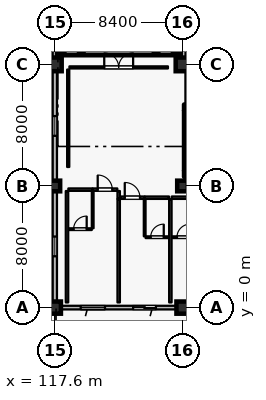
"""IFC4 building model, lengths in metres.
Left out: names, types, materials, properties, quantities, classifications, styles, units other than length and angle.
Written with IfcOpenShell. Run it as: python <this file> out.ifc"""

import sys

from ifc_helpers import new_model, si_unit, direction, frame, frame_2d, origin, origin_2d, place, context, subcontext, project, spatial, rectangle, hollow_rectangle, extrude, element, fill, save


model = new_model("IFC4")
c1 = context("Model", 3, precision=1e-05, world=origin(), true_north=direction((0.0, 1.0)))
c2 = subcontext(c1, "Body", "Model", "MODEL_VIEW")
j1 = project(units=[si_unit("LENGTHUNIT", "METRE"), si_unit("PLANEANGLEUNIT", "RADIAN")], contexts=[c1])
p1 = place(None, origin())
s1 = spatial("IfcSite", under=j1, at=p1, CompositionType="ELEMENT")
p2 = place(p1, origin())
s2 = spatial("IfcBuilding", under=s1, at=p2, CompositionType="ELEMENT")
p3 = place(p2, frame((0.0, 0.0, 25.2)))
s3 = spatial("IfcBuildingStorey", under=s2, at=p3, CompositionType="ELEMENT", Elevation=25.2)
p4 = place(p3, frame((117.6, 0.0, 0.0), z_axis=(0.0, 0.0, 1.0), x_axis=(1.0, 0.0, 0.0)))
e1 = element("IfcColumn", 1, at=p4, inside=s3, PredefinedType="COLUMN", context=c2, shape_type="SweptSolid", body=[
    extrude(rectangle(XDim=0.8, YDim=0.8, at=origin_2d()), origin(), (0.0, 0.0, 1.0), 3.6),
])
p5 = place(p3, frame((117.6, 16.0, 0.0), z_axis=(0.0, 0.0, 1.0), x_axis=(1.0, 0.0, 0.0)))
e2 = element("IfcColumn", 2, at=p5, inside=s3, PredefinedType="COLUMN", context=c2, shape_type="SweptSolid", body=[
    extrude(rectangle(XDim=0.9, YDim=0.9, at=origin_2d()), origin(), (0.0, 0.0, 1.0), 3.6),
])
p6 = place(p3, frame((126.0, 0.0, 0.0), z_axis=(0.0, 0.0, 1.0), x_axis=(1.0, 0.0, 0.0)))
e3 = element("IfcColumn", 3, at=p6, inside=s3, PredefinedType="COLUMN", context=c2, shape_type="SweptSolid", body=[
    extrude(rectangle(XDim=0.8, YDim=0.8, at=origin_2d()), origin(), (0.0, 0.0, 1.0), 3.6),
])
p7 = place(p3, frame((126.0, 16.0, 0.0), z_axis=(0.0, 0.0, 1.0), x_axis=(1.0, 0.0, 0.0)))
e4 = element("IfcColumn", 4, at=p7, inside=s3, PredefinedType="COLUMN", context=c2, shape_type="SweptSolid", body=[
    extrude(rectangle(XDim=0.9, YDim=0.9, at=origin_2d()), origin(), (0.0, 0.0, 1.0), 3.6),
])
for number, where, z_axis, x_axis in (
    (5, (117.6, 8.0, 0.0), (0.0, 0.0, 1.0), (1.0, 0.0, 0.0)),
    (6, (126.0, 8.0, 0.0), (0.0, 0.0, 1.0), (1.0, 0.0, 0.0)),
):
    element("IfcColumn", number, at=place(p3, frame(where, z_axis=z_axis, x_axis=x_axis)), inside=s3, PredefinedType="COLUMN", context=c2, shape_type="SweptSolid", body=[
        extrude(rectangle(XDim=0.7, YDim=0.7, at=origin_2d()), origin(), (0.0, 0.0, 1.0), 3.6),
    ])
p8 = place(p3, frame((125.6, 0.0, 0.0), z_axis=(0.0, 0.0, 1.0), x_axis=(-1.0, 0.0, 0.0)))
e7 = element("IfcWall", 7, at=p8, inside=s3, PredefinedType="SOLIDWALL", context=c2, shape_type="SweptSolid", body=[
    extrude(rectangle(XDim=7.6, YDim=0.24, at=frame_2d((3.8, 0.0))), origin(), (0.0, 0.0, 1.0), 2.93),
])
p9 = place(p8, frame((1.35, 0.0, 0.0)))
e8 = element("IfcOpeningElement", 8, at=p9, cuts=e7, PredefinedType="OPENING", context=c2, shape_type="SweptSolid", body=[
    extrude(rectangle(XDim=1.5, YDim=2.25, at=frame_2d((0.75, 1.125))), frame((0.0, 0.13, 0.0), z_axis=(0.0, -1.0, 0.0), x_axis=(1.0, 0.0, 0.0)), (0.0, 0.0, 1.0), 0.26),
])
p10 = place(p8, frame((4.7, 0.0, 0.8)))
e9 = element("IfcOpeningElement", 9, at=p10, cuts=e7, PredefinedType="OPENING", context=c2, shape_type="SweptSolid", body=[
    extrude(rectangle(XDim=1.6, YDim=1.6, at=frame_2d((0.8, 0.8))), frame((0.0, 0.13, 0.0), z_axis=(0.0, -1.0, 0.0), x_axis=(1.0, 0.0, 0.0)), (0.0, 0.0, 1.0), 0.26),
])
p11 = place(p3, frame((117.6, 0.4, 0.0), z_axis=(0.0, 0.0, 1.0), x_axis=(0.0, 1.0, 0.0)))
e10 = element("IfcWall", 10, at=p11, inside=s3, PredefinedType="SOLIDWALL", context=c2, shape_type="SweptSolid", body=[
    extrude(rectangle(XDim=7.25, YDim=0.28, at=frame_2d((3.625, 0.0))), origin(), (0.0, 0.0, 1.0), 2.7),
])
p12 = place(p11, frame((2.975, 0.0, 0.5)))
e11 = element("IfcOpeningElement", 11, at=p12, cuts=e10, PredefinedType="OPENING", context=c2, shape_type="SweptSolid", body=[
    extrude(rectangle(XDim=1.3, YDim=1.65, at=frame_2d((0.65, 0.825))), frame((0.0, 0.15, 0.0), z_axis=(0.0, -1.0, 0.0), x_axis=(1.0, 0.0, 0.0)), (0.0, 0.0, 1.0), 0.3),
])
p13 = place(p3, frame((117.6, 8.35, 0.0), z_axis=(0.0, 0.0, 1.0), x_axis=(0.0, 1.0, 0.0)))
e12 = element("IfcWall", 12, at=p13, inside=s3, PredefinedType="SOLIDWALL", context=c2, shape_type="SweptSolid", body=[
    extrude(rectangle(XDim=7.2, YDim=0.28, at=frame_2d((3.6, 0.0))), origin(), (0.0, 0.0, 1.0), 2.7),
])
p14 = place(p13, frame((2.95, 0.0, 0.5)))
e13 = element("IfcOpeningElement", 13, at=p14, cuts=e12, PredefinedType="OPENING", context=c2, shape_type="SweptSolid", body=[
    extrude(rectangle(XDim=1.3, YDim=1.65, at=frame_2d((0.65, 0.825))), frame((0.0, 0.15, 0.0), z_axis=(0.0, -1.0, 0.0), x_axis=(1.0, 0.0, 0.0)), (0.0, 0.0, 1.0), 0.3),
])
p15 = place(p3, frame((117.6, 16.45, 0.0), z_axis=(0.0, 0.0, 1.0), x_axis=(0.0, 1.0, 0.0)))
e14 = element("IfcWall", 14, at=p15, inside=s3, PredefinedType="SOLIDWALL", context=c2, shape_type="SweptSolid", body=[
    extrude(rectangle(XDim=7.2, YDim=0.28, at=frame_2d((3.6, 0.0))), origin(), (0.0, 0.0, 1.0), 2.7),
])
p16 = place(p15, frame((2.95, 0.0, 0.5)))
e15 = element("IfcOpeningElement", 15, at=p16, cuts=e14, PredefinedType="OPENING", context=c2, shape_type="SweptSolid", body=[
    extrude(rectangle(XDim=1.3, YDim=1.65, at=frame_2d((0.65, 0.825))), frame((0.0, 0.15, 0.0), z_axis=(0.0, -1.0, 0.0), x_axis=(1.0, 0.0, 0.0)), (0.0, 0.0, 1.0), 0.3),
])
p17 = place(p3, frame((126.1, 8.8, 0.0), z_axis=(0.0, 0.0, 1.0), x_axis=(1.0, 0.0, 0.0)))
e16 = element("IfcWall", 16, at=p17, inside=s3, PredefinedType="SHEAR", context=c2, shape_type="SweptSolid", body=[
    extrude(rectangle(XDim=8.2, YDim=0.4, at=frame_2d((4.1, 0.0))), origin(), (0.0, 0.0, 1.0), 3.335),
])
p18 = place(p3, frame((126.1, 13.16, 0.0), z_axis=(0.0, 0.0, 1.0), x_axis=(1.0, 0.0, 0.0)))
e17 = element("IfcWall", 17, at=p18, inside=s3, PredefinedType="SHEAR", context=c2, shape_type="SweptSolid", body=[
    extrude(rectangle(XDim=8.2, YDim=0.4, at=frame_2d((4.1, 0.0))), origin(), (0.0, 0.0, 1.0), 3.335),
])
p19 = place(p18, frame((0.43, 0.0, 0.0)))
e18 = element("IfcOpeningElement", 18, at=p19, cuts=e17, PredefinedType="OPENING", context=c2, shape_type="SweptSolid", body=[
    extrude(rectangle(XDim=1.16, YDim=2.2, at=frame_2d((0.58, 1.1))), frame((0.0, 0.21, 0.0), z_axis=(0.0, -1.0, 0.0), x_axis=(1.0, 0.0, 0.0)), (0.0, 0.0, 1.0), 0.42),
])
p20 = place(p3, frame((126.3, 9.005, 0.0), z_axis=(0.0, 0.0, 1.0), x_axis=(0.0, 1.0, 0.0)))
e19 = element("IfcWall", 19, at=p20, inside=s3, PredefinedType="SHEAR", context=c2, shape_type="SweptSolid", body=[
    extrude(rectangle(XDim=3.95, YDim=0.4, at=frame_2d((1.975, 0.0))), origin(), (0.0, 0.0, 1.0), 3.335),
])
p21 = place(p3, frame((126.3, 13.365, 0.0), z_axis=(0.0, 0.0, 1.0), x_axis=(0.0, 1.0, 0.0)))
e20 = element("IfcWall", 20, at=p21, inside=s3, PredefinedType="PARTITIONING", context=c2, shape_type="SweptSolid", body=[
    extrude(rectangle(XDim=5.82, YDim=0.22, at=frame_2d((2.91, 0.0))), origin(), (0.0, 0.0, 1.0), 3.335),
])
p22 = place(p3, frame((117.75, 16.8, 0.0), z_axis=(0.0, 0.0, 1.0), x_axis=(1.0, 0.0, 0.0)))
e21 = element("IfcWall", 21, at=p22, inside=s3, PredefinedType="SHEAR", context=c2, shape_type="SweptSolid", body=[
    extrude(rectangle(XDim=8.15, YDim=0.4, at=frame_2d((4.075, 0.0))), origin(), (0.0, 0.0, 1.0), 3.335),
])
for number, where, z_axis, x_axis in (
    (22, (118.08, 16.8, 0.0), (0.0, 0.0, 1.0), (1.0, 0.0, 0.0)),
    (23, (119.34, 16.8, 0.0), (0.0, 0.0, 1.0), (1.0, 0.0, 0.0)),
):
    element("IfcColumn", number, at=place(p3, frame(where, z_axis=z_axis, x_axis=x_axis)), inside=s3, PredefinedType="COLUMN", context=c2, shape_type="SweptSolid", body=[
        extrude(hollow_rectangle(XDim=0.3, YDim=0.3, WallThickness=0.012, at=origin_2d()), origin(), (0.0, 0.0, 1.0), 3.42),
    ])
for number, where, z_axis, x_axis in (
    (24, (124.26, 16.8, -2.1), (0.0, 0.0, 1.0), (1.0, 0.0, 0.0)),
    (25, (125.52, 16.8, -2.1), (0.0, 0.0, 1.0), (1.0, 0.0, 0.0)),
):
    element("IfcColumn", number, at=place(p3, frame(where, z_axis=z_axis, x_axis=x_axis)), inside=s3, PredefinedType="COLUMN", context=c2, shape_type="SweptSolid", body=[
        extrude(hollow_rectangle(XDim=0.3, YDim=0.3, WallThickness=0.012, at=origin_2d()), origin(), (0.0, 0.0, 1.0), 3.72),
    ])
p23 = place(p3, frame((118.49, 7.76, 0.0), z_axis=(0.0, 0.0, 1.0), x_axis=(1.0, 0.0, 0.0)))
e26 = element("IfcWall", 26, at=p23, inside=s3, PredefinedType="PARTITIONING", context=c2, shape_type="SweptSolid", body=[
    extrude(rectangle(XDim=1.59, YDim=0.16, at=frame_2d((0.795, 0.0))), origin(), (0.0, 0.0, 1.0), 3.335),
])
p24 = place(p3, frame((120.09, 7.76, 0.0), z_axis=(0.0, 0.0, 1.0), x_axis=(1.0, 0.0, 0.0)))
e27 = element("IfcWall", 27, at=p24, inside=s3, PredefinedType="PARTITIONING", context=c2, shape_type="SweptSolid", body=[
    extrude(rectangle(XDim=1.62, YDim=0.16, at=frame_2d((0.81, 0.0))), origin(), (0.0, 0.0, 1.0), 3.335),
])
p25 = place(p24, frame((0.33, 0.0, 0.0)))
e28 = element("IfcOpeningElement", 28, at=p25, cuts=e27, PredefinedType="OPENING", context=c2, shape_type="SweptSolid", body=[
    extrude(rectangle(XDim=0.96, YDim=2.2, at=frame_2d((0.48, 1.1))), frame((0.0, 0.09, 0.0), z_axis=(0.0, -1.0, 0.0), x_axis=(1.0, 0.0, 0.0)), (0.0, 0.0, 1.0), 0.18),
])
p26 = place(p3, frame((120.09, 5.22, 0.0), z_axis=(0.0, 0.0, 1.0), x_axis=(0.0, 1.0, 0.0)))
e29 = element("IfcWall", 29, at=p26, inside=s3, PredefinedType="PARTITIONING", context=c2, shape_type="SweptSolid", body=[
    extrude(rectangle(XDim=2.45, YDim=0.115, at=frame_2d((1.225, 0.0))), origin(), (0.0, 0.0, 1.0), 3.335),
])
p27 = place(p3, frame((118.5, 5.16, 0.0), z_axis=(0.0, 0.0, 1.0), x_axis=(1.0, 0.0, 0.0)))
e30 = element("IfcWall", 30, at=p27, inside=s3, PredefinedType="PARTITIONING", context=c2, shape_type="SweptSolid", body=[
    extrude(rectangle(XDim=1.53, YDim=0.115, at=frame_2d((0.765, 0.0))), origin(), (0.0, 0.0, 1.0), 3.335),
])
p28 = place(p27, frame((0.335, 0.0, 0.0)))
e31 = element("IfcOpeningElement", 31, at=p28, cuts=e30, PredefinedType="OPENING", context=c2, shape_type="SweptSolid", body=[
    extrude(rectangle(XDim=0.86, YDim=2.12, at=frame_2d((0.43, 1.06))), frame((0.0, 0.067, 0.0), z_axis=(0.0, -1.0, 0.0), x_axis=(1.0, 0.0, 0.0)), (0.0, 0.0, 1.0), 0.135),
])
p29 = place(p3, frame((118.4, 0.34, 0.0), z_axis=(0.0, 0.0, 1.0), x_axis=(0.0, 1.0, 0.0)))
e32 = element("IfcWall", 32, at=p29, inside=s3, PredefinedType="PARTITIONING", context=c2, shape_type="SweptSolid", body=[
    extrude(rectangle(XDim=7.33, YDim=0.16, at=frame_2d((3.665, 0.0))), origin(), (0.0, 0.0, 1.0), 3.335),
])
p30 = place(p3, frame((121.8, 7.15, 0.0), z_axis=(0.0, 0.0, 1.0), x_axis=(0.0, 1.0, 0.0)))
e33 = element("IfcWall", 33, at=p30, inside=s3, PredefinedType="PARTITIONING", context=c2, shape_type="SweptSolid", body=[
    extrude(rectangle(XDim=0.52, YDim=0.16, at=frame_2d((0.26, 0.0))), origin(), (0.0, 0.0, 1.0), 3.335),
])
p31 = place(p3, frame((121.89, 7.23, 0.0), z_axis=(0.0, 0.0, 1.0), x_axis=(1.0, 0.0, 0.0)))
e34 = element("IfcWall", 34, at=p31, inside=s3, PredefinedType="PARTITIONING", context=c2, shape_type="SweptSolid", body=[
    extrude(rectangle(XDim=1.62, YDim=0.16, at=frame_2d((0.81, 0.0))), origin(), (0.0, 0.0, 1.0), 3.335),
])
p32 = place(p31, frame((0.31, 0.0, 0.0)))
e35 = element("IfcOpeningElement", 35, at=p32, cuts=e34, PredefinedType="OPENING", context=c2, shape_type="SweptSolid", body=[
    extrude(rectangle(XDim=1.0, YDim=2.25, at=frame_2d((0.5, 1.125))), frame((0.0, 0.09, 0.0), z_axis=(0.0, -1.0, 0.0), x_axis=(1.0, 0.0, 0.0)), (0.0, 0.0, 1.0), 0.18),
])
p33 = place(p3, frame((123.52, 7.23, 0.0), z_axis=(0.0, 0.0, 1.0), x_axis=(1.0, 0.0, 0.0)))
e36 = element("IfcWall", 36, at=p33, inside=s3, PredefinedType="PARTITIONING", context=c2, shape_type="SweptSolid", body=[
    extrude(rectangle(XDim=1.59, YDim=0.16, at=frame_2d((0.795, 0.0))), origin(), (0.0, 0.0, 1.0), 3.335),
])
p34 = place(p3, frame((123.51, 4.69, 0.0), z_axis=(0.0, 0.0, 1.0), x_axis=(0.0, 1.0, 0.0)))
e37 = element("IfcWall", 37, at=p34, inside=s3, PredefinedType="PARTITIONING", context=c2, shape_type="SweptSolid", body=[
    extrude(rectangle(XDim=2.45, YDim=0.115, at=frame_2d((1.225, 0.0))), origin(), (0.0, 0.0, 1.0), 3.335),
])
p35 = place(p3, frame((123.57, 4.63, 0.0), z_axis=(0.0, 0.0, 1.0), x_axis=(1.0, 0.0, 0.0)))
e38 = element("IfcWall", 38, at=p35, inside=s3, PredefinedType="PARTITIONING", context=c2, shape_type="SweptSolid", body=[
    extrude(rectangle(XDim=1.53, YDim=0.115, at=frame_2d((0.765, 0.0))), origin(), (0.0, 0.0, 1.0), 3.335),
])
p36 = place(p35, frame((0.335, 0.0, 0.0)))
e39 = element("IfcOpeningElement", 39, at=p36, cuts=e38, PredefinedType="OPENING", context=c2, shape_type="SweptSolid", body=[
    extrude(rectangle(XDim=0.86, YDim=2.12, at=frame_2d((0.43, 1.06))), frame((0.0, 0.067, 0.0), z_axis=(0.0, -1.0, 0.0), x_axis=(1.0, 0.0, 0.0)), (0.0, 0.0, 1.0), 0.135),
])
p37 = place(p3, frame((121.8, 0.34, 0.0), z_axis=(0.0, 0.0, 1.0), x_axis=(0.0, 1.0, 0.0)))
e40 = element("IfcWall", 40, at=p37, inside=s3, PredefinedType="PARTITIONING", context=c2, shape_type="SweptSolid", body=[
    extrude(rectangle(XDim=6.8, YDim=0.16, at=frame_2d((3.4, 0.0))), origin(), (0.0, 0.0, 1.0), 3.335),
])
p38 = place(p3, frame((125.29, 7.23, 0.0), z_axis=(0.0, 0.0, 1.0), x_axis=(1.0, 0.0, 0.0)))
e41 = element("IfcWall", 41, at=p38, inside=s3, PredefinedType="PARTITIONING", context=c2, shape_type="SweptSolid", body=[
    extrude(rectangle(XDim=1.59, YDim=0.16, at=frame_2d((0.795, 0.0))), origin(), (0.0, 0.0, 1.0), 3.335),
])
p39 = place(p3, frame((125.3, 4.63, 0.0), z_axis=(0.0, 0.0, 1.0), x_axis=(1.0, 0.0, 0.0)))
e42 = element("IfcWall", 42, at=p39, inside=s3, PredefinedType="PARTITIONING", context=c2, shape_type="SweptSolid", body=[
    extrude(rectangle(XDim=1.53, YDim=0.115, at=frame_2d((0.765, 0.0))), origin(), (0.0, 0.0, 1.0), 3.335),
])
p40 = place(p39, frame((0.335, 0.0, 0.0)))
e43 = element("IfcOpeningElement", 43, at=p40, cuts=e42, PredefinedType="OPENING", context=c2, shape_type="SweptSolid", body=[
    extrude(rectangle(XDim=0.86, YDim=2.12, at=frame_2d((0.43, 1.06))), frame((0.0, 0.067, 0.0), z_axis=(0.0, -1.0, 0.0), x_axis=(1.0, 0.0, 0.0)), (0.0, 0.0, 1.0), 0.135),
])
p41 = place(p3, frame((125.2, 0.34, 0.0), z_axis=(0.0, 0.0, 1.0), x_axis=(0.0, 1.0, 0.0)))
e44 = element("IfcWall", 44, at=p41, inside=s3, PredefinedType="PARTITIONING", context=c2, shape_type="SweptSolid", body=[
    extrude(rectangle(XDim=6.8, YDim=0.16, at=frame_2d((3.4, 0.0))), origin(), (0.0, 0.0, 1.0), 3.335),
])
p42 = place(p3, frame((118.56, 15.8, 0.0), z_axis=(0.0, 0.0, 1.0), x_axis=(1.0, 0.0, 0.0)))
e45 = element("IfcWall", 45, at=p42, inside=s3, PredefinedType="PARTITIONING", context=c2, shape_type="SweptSolid", body=[
    extrude(rectangle(XDim=6.48, YDim=0.14, at=frame_2d((3.24, 0.0))), origin(), (0.0, 0.0, 1.0), 3.335),
])
p43 = place(p42, frame((2.29, 0.0, 0.0)))
e46 = element("IfcOpeningElement", 46, at=p43, cuts=e45, PredefinedType="OPENING", context=c2, shape_type="SweptSolid", body=[
    extrude(rectangle(XDim=1.9, YDim=2.4, at=frame_2d((0.95, 1.2))), frame((0.0, 0.08, 0.0), z_axis=(0.0, -1.0, 0.0), x_axis=(1.0, 0.0, 0.0)), (0.0, 0.0, 1.0), 0.16),
])
p44 = place(p3, frame((118.48, 9.25, 0.0), z_axis=(0.0, 0.0, 1.0), x_axis=(0.0, 1.0, 0.0)))
e47 = element("IfcWall", 47, at=p44, inside=s3, PredefinedType="PARTITIONING", context=c2, shape_type="SweptSolid", body=[
    extrude(rectangle(XDim=6.41, YDim=0.14, at=frame_2d((3.205, 0.0))), origin(), (0.0, 0.0, 1.0), 3.335),
])
p45 = place(p9, origin())
e48 = element("IfcDoor", 48, at=p45, inside=s3, OperationType="SLIDING_TO_LEFT", PredefinedType="DOOR", context=c2, shape_type="SweptSolid", body=[
    extrude(rectangle(XDim=1.5, YDim=2.25, at=frame_2d((0.75, 1.125))), frame((0.0, 0.025, 0.0), z_axis=(0.0, -1.0, 0.0), x_axis=(1.0, 0.0, 0.0)), (0.0, 0.0, 1.0), 0.05),
])
fill(e8, e48)
p46 = place(p10, origin())
e49 = element("IfcWindow", 49, at=p46, inside=s3, PartitioningType="SINGLE_PANEL", PredefinedType="WINDOW", context=c2, shape_type="SweptSolid", body=[
    extrude(rectangle(XDim=1.6, YDim=1.6, at=frame_2d((0.8, 0.8))), frame((0.0, 0.03, 0.0), z_axis=(0.0, -1.0, 0.0), x_axis=(1.0, 0.0, 0.0)), (0.0, 0.0, 1.0), 0.06),
])
fill(e9, e49)
p47 = place(p12, origin())
e50 = element("IfcWindow", 50, at=p47, inside=s3, PartitioningType="SINGLE_PANEL", PredefinedType="WINDOW", context=c2, shape_type="SweptSolid", body=[
    extrude(rectangle(XDim=1.3, YDim=1.65, at=frame_2d((0.65, 0.825))), frame((0.0, 0.03, 0.0), z_axis=(0.0, -1.0, 0.0), x_axis=(1.0, 0.0, 0.0)), (0.0, 0.0, 1.0), 0.06),
])
fill(e11, e50)
p48 = place(p14, origin())
e51 = element("IfcWindow", 51, at=p48, inside=s3, PartitioningType="SINGLE_PANEL", PredefinedType="WINDOW", context=c2, shape_type="SweptSolid", body=[
    extrude(rectangle(XDim=1.3, YDim=1.65, at=frame_2d((0.65, 0.825))), frame((0.0, 0.03, 0.0), z_axis=(0.0, -1.0, 0.0), x_axis=(1.0, 0.0, 0.0)), (0.0, 0.0, 1.0), 0.06),
])
fill(e13, e51)
p49 = place(p25, origin())
e52 = element("IfcDoor", 52, at=p49, inside=s3, OperationType="SINGLE_SWING_LEFT", PredefinedType="DOOR", context=c2, shape_type="SweptSolid", body=[
    extrude(rectangle(XDim=0.96, YDim=2.2, at=frame_2d((0.48, 1.1))), frame((0.0, 0.025, 0.0), z_axis=(0.0, -1.0, 0.0), x_axis=(1.0, 0.0, 0.0)), (0.0, 0.0, 1.0), 0.05),
])
fill(e28, e52)
p50 = place(p28, origin())
e53 = element("IfcDoor", 53, at=p50, inside=s3, OperationType="SINGLE_SWING_RIGHT", PredefinedType="DOOR", context=c2, shape_type="SweptSolid", body=[
    extrude(rectangle(XDim=0.86, YDim=2.12, at=frame_2d((0.43, 1.06))), frame((0.0, 0.025, 0.0), z_axis=(0.0, -1.0, 0.0), x_axis=(1.0, 0.0, 0.0)), (0.0, 0.0, 1.0), 0.05),
])
fill(e31, e53)
p51 = place(p32, origin())
e54 = element("IfcDoor", 54, at=p51, inside=s3, OperationType="SINGLE_SWING_LEFT", PredefinedType="DOOR", context=c2, shape_type="SweptSolid", body=[
    extrude(rectangle(XDim=1.0, YDim=2.25, at=frame_2d((0.5, 1.125))), frame((0.0, 0.025, 0.0), z_axis=(0.0, -1.0, 0.0), x_axis=(1.0, 0.0, 0.0)), (0.0, 0.0, 1.0), 0.05),
])
fill(e35, e54)
p52 = place(p36, origin())
e55 = element("IfcDoor", 55, at=p52, inside=s3, OperationType="SINGLE_SWING_RIGHT", PredefinedType="DOOR", context=c2, shape_type="SweptSolid", body=[
    extrude(rectangle(XDim=0.86, YDim=2.12, at=frame_2d((0.43, 1.06))), frame((0.0, 0.025, 0.0), z_axis=(0.0, -1.0, 0.0), x_axis=(1.0, 0.0, 0.0)), (0.0, 0.0, 1.0), 0.05),
])
fill(e39, e55)
p53 = place(p40, origin())
e56 = element("IfcDoor", 56, at=p53, inside=s3, OperationType="SINGLE_SWING_RIGHT", PredefinedType="DOOR", context=c2, shape_type="SweptSolid", body=[
    extrude(rectangle(XDim=0.86, YDim=2.12, at=frame_2d((0.43, 1.06))), frame((0.0, 0.025, 0.0), z_axis=(0.0, -1.0, 0.0), x_axis=(1.0, 0.0, 0.0)), (0.0, 0.0, 1.0), 0.05),
])
fill(e43, e56)
p54 = place(p43, origin())
e57 = element("IfcDoor", 57, at=p54, inside=s3, OperationType="DOUBLE_DOOR_SINGLE_SWING", PredefinedType="DOOR", context=c2, shape_type="SweptSolid", body=[
    extrude(rectangle(XDim=1.9, YDim=2.4, at=frame_2d((0.95, 1.2))), frame((0.0, 0.025, 0.0), z_axis=(0.0, -1.0, 0.0), x_axis=(1.0, 0.0, 0.0)), (0.0, 0.0, 1.0), 0.05),
])
fill(e46, e57)
save(model, sys.argv[1])
